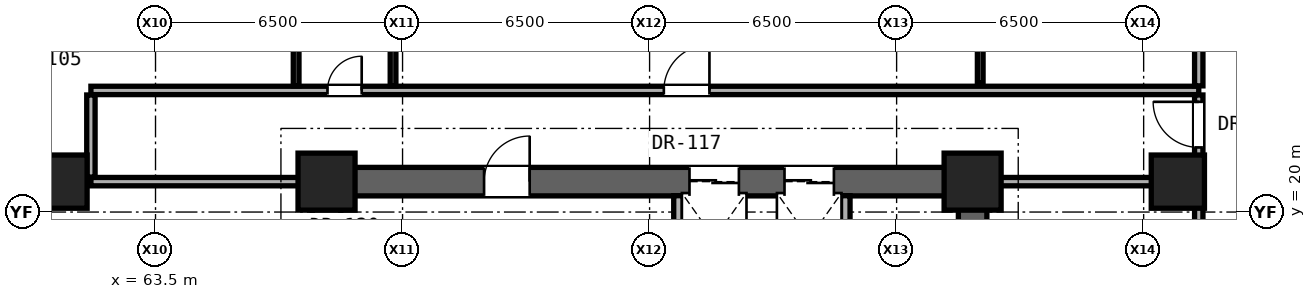
"""IFC4 building model, lengths in metres.
Left out: names, types, materials, properties, quantities, classifications, styles, units other than length and angle.
Written with IfcOpenShell. Run it as: python <this file> out.ifc"""

import sys

from ifc_helpers import new_model, si_unit, direction, frame, frame_2d, origin, origin_2d, place, context, subcontext, project, spatial, rectangle, hollow_rectangle, extrude, element, fill, save


model = new_model("IFC4")
c1 = context("Model", 3, precision=1e-05, world=origin(), true_north=direction((0.0, 1.0)))
c2 = subcontext(c1, "Body", "Model", "MODEL_VIEW")
j1 = project(units=[si_unit("LENGTHUNIT", "METRE"), si_unit("PLANEANGLEUNIT", "RADIAN")], contexts=[c1])
p1 = place(None, origin())
s1 = spatial("IfcSite", under=j1, at=p1, CompositionType="ELEMENT")
p2 = place(p1, origin())
s2 = spatial("IfcBuilding", under=s1, at=p2, CompositionType="ELEMENT")
p3 = place(p2, origin())
s3 = spatial("IfcBuildingStorey", under=s2, at=p3, CompositionType="ELEMENT", Elevation=0.0)
for number, where, z_axis, x_axis in (
    (1, (68.0, 20.8, 0.0), (0.0, 0.0, 1.0), (1.0, 0.0, 0.0)),
    (2, (85.0, 20.8, 0.0), (0.0, 0.0, 1.0), (1.0, 0.0, 0.0)),
):
    element("IfcColumn", number, at=place(p3, frame(where, z_axis=z_axis, x_axis=x_axis)), inside=s3, PredefinedType="COLUMN", context=c2, shape_type="SweptSolid", body=[
        extrude(rectangle(XDim=1.5, YDim=1.5, at=origin_2d()), origin(), (0.0, 0.0, 1.0), 5.2),
    ])
for number, where, z_axis, x_axis in (
    (3, (61.0, 20.8, 0.0), (0.0, 0.0, 1.0), (1.0, 0.0, 0.0)),
    (4, (90.4, 20.8, 0.0), (0.0, 0.0, 1.0), (1.0, 0.0, 0.0)),
):
    element("IfcColumn", number, at=place(p3, frame(where, z_axis=z_axis, x_axis=x_axis)), inside=s3, PredefinedType="COLUMN", context=c2, shape_type="SweptSolid", body=[
        extrude(hollow_rectangle(XDim=1.4, YDim=1.4, WallThickness=0.08, at=origin_2d()), origin(), (0.0, 0.0, 1.0), 5.2),
    ])
for number, where, z_axis, x_axis in (
    (5, (68.0, 15.2, 0.0), (0.0, 0.0, 1.0), (0.0, 1.0, 0.0)),
    (6, (85.0, 15.2, 0.0), (0.0, 0.0, 1.0), (0.0, 1.0, 0.0)),
):
    element("IfcWall", number, at=place(p3, frame(where, z_axis=z_axis, x_axis=x_axis)), inside=s3, PredefinedType="SHEAR", context=c2, shape_type="SweptSolid", body=[
        extrude(rectangle(XDim=5.6, YDim=0.75, at=frame_2d((2.8, 0.0))), origin(), (0.0, 0.0, 1.0), 4.88),
    ])
p4 = place(p3, frame((68.0, 20.8, 0.0), z_axis=(0.0, 0.0, 1.0), x_axis=(1.0, 0.0, 0.0)))
e7 = element("IfcWall", 7, at=p4, inside=s3, PredefinedType="SHEAR", context=c2, shape_type="SweptSolid", body=[
    extrude(rectangle(XDim=17.0, YDim=0.75, at=frame_2d((8.5, 0.0))), origin(), (0.0, 0.0, 1.0), 4.88),
])
p5 = place(p4, frame((4.145, 0.0, 0.0)))
e8 = element("IfcOpeningElement", 8, at=p5, cuts=e7, PredefinedType="OPENING", context=c2, shape_type="SweptSolid", body=[
    extrude(rectangle(XDim=1.2, YDim=2.25, at=frame_2d((0.6, 1.125))), frame((0.0, 0.385, 0.0), z_axis=(0.0, -1.0, 0.0), x_axis=(1.0, 0.0, 0.0)), (0.0, 0.0, 1.0), 0.77),
])
p6 = place(p4, frame((9.55, 0.0, 0.0)))
e9 = element("IfcOpeningElement", 9, at=p6, cuts=e7, PredefinedType="OPENING", context=c2, shape_type="SweptSolid", body=[
    extrude(rectangle(XDim=1.3, YDim=2.3, at=frame_2d((0.65, 1.15))), frame((0.0, 0.385, 0.0), z_axis=(0.0, -1.0, 0.0), x_axis=(1.0, 0.0, 0.0)), (0.0, 0.0, 1.0), 0.77),
])
p7 = place(p4, frame((12.05, 0.0, 0.0)))
e10 = element("IfcOpeningElement", 10, at=p7, cuts=e7, PredefinedType="OPENING", context=c2, shape_type="SweptSolid", body=[
    extrude(rectangle(XDim=1.3, YDim=2.3, at=frame_2d((0.65, 1.15))), frame((0.0, 0.385, 0.0), z_axis=(0.0, -1.0, 0.0), x_axis=(1.0, 0.0, 0.0)), (0.0, 0.0, 1.0), 0.77),
])
p8 = place(p3, frame((61.8, 20.8, 0.0), z_axis=(0.0, 0.0, 1.0), x_axis=(1.0, 0.0, 0.0)))
e11 = element("IfcWall", 11, at=p8, inside=s3, PredefinedType="SOLIDWALL", context=c2, shape_type="SweptSolid", body=[
    extrude(rectangle(XDim=5.83, YDim=0.22, at=frame_2d((2.915, 0.0))), origin(), (0.0, 0.0, 1.0), 3.772),
])
p9 = place(p3, frame((85.37, 20.8, 0.0), z_axis=(0.0, 0.0, 1.0), x_axis=(1.0, 0.0, 0.0)))
e12 = element("IfcWall", 12, at=p9, inside=s3, PredefinedType="SOLIDWALL", context=c2, shape_type="SweptSolid", body=[
    extrude(rectangle(XDim=5.58, YDim=0.22, at=frame_2d((2.79, 0.0))), origin(), (0.0, 0.0, 1.0), 3.772),
])
p10 = place(p3, frame((61.8, 23.2, 0.0), z_axis=(0.0, 0.0, 1.0), x_axis=(1.0, 0.0, 0.0)))
e13 = element("IfcWall", 13, at=p10, inside=s3, PredefinedType="SOLIDWALL", context=c2, shape_type="SweptSolid", body=[
    extrude(rectangle(XDim=29.15, YDim=0.22, at=frame_2d((14.575, 0.0))), origin(), (0.0, 0.0, 1.0), 3.945),
])
p11 = place(p10, frame((6.225, 0.0, 0.0)))
e14 = element("IfcOpeningElement", 14, at=p11, cuts=e13, PredefinedType="OPENING", context=c2, shape_type="SweptSolid", body=[
    extrude(rectangle(XDim=0.9, YDim=2.1, at=frame_2d((0.45, 1.05))), frame((0.0, 0.12, 0.0), z_axis=(0.0, -1.0, 0.0), x_axis=(1.0, 0.0, 0.0)), (0.0, 0.0, 1.0), 0.24),
])
p12 = place(p10, frame((15.075, 0.0, 0.0)))
e15 = element("IfcOpeningElement", 15, at=p12, cuts=e13, PredefinedType="OPENING", context=c2, shape_type="SweptSolid", body=[
    extrude(rectangle(XDim=1.2, YDim=2.25, at=frame_2d((0.6, 1.125))), frame((0.0, 0.12, 0.0), z_axis=(0.0, -1.0, 0.0), x_axis=(1.0, 0.0, 0.0)), (0.0, 0.0, 1.0), 0.24),
])
p13 = place(p3, frame((61.8, 20.92, 0.0), z_axis=(0.0, 0.0, 1.0), x_axis=(0.0, 1.0, 0.0)))
e16 = element("IfcWall", 16, at=p13, inside=s3, PredefinedType="SOLIDWALL", context=c2, shape_type="SweptSolid", body=[
    extrude(rectangle(XDim=2.16, YDim=0.22, at=frame_2d((1.08, 0.0))), origin(), (0.0, 0.0, 1.0), 3.772),
])
for number, where, z_axis, x_axis in (
    (17, (67.2, 23.32, 0.0), (0.0, 0.0, 1.0), (0.0, 1.0, 0.0)),
    (18, (69.75, 23.32, 0.0), (0.0, 0.0, 1.0), (0.0, 1.0, 0.0)),
):
    element("IfcWall", number, at=place(p3, frame(where, z_axis=z_axis, x_axis=x_axis)), inside=s3, PredefinedType="PARTITIONING", context=c2, shape_type="SweptSolid", body=[
        extrude(rectangle(XDim=2.395, YDim=0.15, at=frame_2d((1.198, 0.0))), origin(), (0.0, 0.0, 1.0), 4.88),
    ])
p14 = place(p3, frame((77.26, 18.735, 0.0), z_axis=(0.0, 0.0, 1.0), x_axis=(0.0, 1.0, 0.0)))
e19 = element("IfcWall", 19, at=p14, inside=s3, PredefinedType="SOLIDWALL", context=c2, shape_type="SweptSolid", body=[
    extrude(rectangle(XDim=1.695, YDim=0.25, at=frame_2d((0.847, 0.0))), origin(), (0.0, 0.0, 1.0), 4.88),
])
p15 = place(p3, frame((81.65, 18.185, 0.0), z_axis=(0.0, 0.0, 1.0), x_axis=(0.0, 1.0, 0.0)))
e20 = element("IfcWall", 20, at=p15, inside=s3, PredefinedType="SOLIDWALL", context=c2, shape_type="SweptSolid", body=[
    extrude(rectangle(XDim=2.245, YDim=0.25, at=frame_2d((1.123, 0.0))), origin(), (0.0, 0.0, 1.0), 4.88),
])
p16 = place(p3, frame((85.2, 23.4, 0.0), z_axis=(0.0, 0.0, 1.0), x_axis=(0.0, 1.0, 0.0)))
e21 = element("IfcWall", 21, at=p16, inside=s3, PredefinedType="PARTITIONING", context=c2, shape_type="SweptSolid", body=[
    extrude(rectangle(XDim=5.715, YDim=0.15, at=frame_2d((2.857, 0.0))), origin(), (0.0, 0.0, 1.0), 3.945),
])
p17 = place(p3, frame((90.95, 12.77, 0.0), z_axis=(0.0, 0.0, 1.0), x_axis=(0.0, 1.0, 0.0)))
e22 = element("IfcWall", 22, at=p17, inside=s3, PredefinedType="SOLIDWALL", context=c2, shape_type="SweptSolid", body=[
    extrude(rectangle(XDim=7.91, YDim=0.22, at=frame_2d((3.955, 0.0))), origin(), (0.0, 0.0, 1.0), 4.016),
])
p18 = place(p3, frame((90.95, 20.92, 0.0), z_axis=(0.0, 0.0, 1.0), x_axis=(0.0, 1.0, 0.0)))
e23 = element("IfcWall", 23, at=p18, inside=s3, PredefinedType="SOLIDWALL", context=c2, shape_type="SweptSolid", body=[
    extrude(rectangle(XDim=2.16, YDim=0.22, at=frame_2d((1.08, 0.0))), origin(), (0.0, 0.0, 1.0), 4.88),
])
p19 = place(p18, frame((0.78, 0.0, 0.0)))
e24 = element("IfcOpeningElement", 24, at=p19, cuts=e23, PredefinedType="OPENING", context=c2, shape_type="SweptSolid", body=[
    extrude(rectangle(XDim=1.2, YDim=2.25, at=frame_2d((0.6, 1.125))), frame((0.0, 0.12, 0.0), z_axis=(0.0, -1.0, 0.0), x_axis=(1.0, 0.0, 0.0)), (0.0, 0.0, 1.0), 0.24),
])
p20 = place(p3, frame((90.95, 23.32, 0.0), z_axis=(0.0, 0.0, 1.0), x_axis=(0.0, 1.0, 0.0)))
e25 = element("IfcWall", 25, at=p20, inside=s3, PredefinedType="SOLIDWALL", context=c2, shape_type="SweptSolid", body=[
    extrude(rectangle(XDim=5.96, YDim=0.22, at=frame_2d((2.98, 0.0))), origin(), (0.0, 0.0, 1.0), 4.099),
])
p21 = place(p19, origin())
e26 = element("IfcDoor", 26, at=p21, inside=s3, OperationType="SINGLE_SWING_RIGHT", PredefinedType="DOOR", context=c2, shape_type="SweptSolid", body=[
    extrude(rectangle(XDim=1.2, YDim=2.25, at=frame_2d((0.6, 1.125))), frame((0.0, 0.025, 0.0), z_axis=(0.0, -1.0, 0.0), x_axis=(1.0, 0.0, 0.0)), (0.0, 0.0, 1.0), 0.05),
])
fill(e24, e26)
p22 = place(p5, origin())
e27 = element("IfcDoor", 27, at=p22, inside=s3, OperationType="SINGLE_SWING_RIGHT", PredefinedType="DOOR", context=c2, shape_type="SweptSolid", body=[
    extrude(rectangle(XDim=1.2, YDim=2.25, at=frame_2d((0.6, 1.125))), frame((0.0, 0.025, 0.0), z_axis=(0.0, -1.0, 0.0), x_axis=(1.0, 0.0, 0.0)), (0.0, 0.0, 1.0), 0.05),
])
fill(e8, e27)
p23 = place(p11, origin())
e28 = element("IfcDoor", 28, at=p23, inside=s3, OperationType="SINGLE_SWING_RIGHT", PredefinedType="DOOR", context=c2, shape_type="SweptSolid", body=[
    extrude(rectangle(XDim=0.9, YDim=2.1, at=frame_2d((0.45, 1.05))), frame((0.0, 0.025, 0.0), z_axis=(0.0, -1.0, 0.0), x_axis=(1.0, 0.0, 0.0)), (0.0, 0.0, 1.0), 0.05),
])
fill(e14, e28)
p24 = place(p12, origin())
e29 = element("IfcDoor", 29, at=p24, inside=s3, OperationType="SINGLE_SWING_RIGHT", PredefinedType="DOOR", context=c2, shape_type="SweptSolid", body=[
    extrude(rectangle(XDim=1.2, YDim=2.25, at=frame_2d((0.6, 1.125))), frame((0.0, 0.025, 0.0), z_axis=(0.0, -1.0, 0.0), x_axis=(1.0, 0.0, 0.0)), (0.0, 0.0, 1.0), 0.05),
])
fill(e15, e29)
p25 = place(p6, origin())
e30 = element("IfcDoor", 30, at=p25, inside=s3, OperationType="DOUBLE_DOOR_SLIDING", PredefinedType="DOOR", context=c2, shape_type="SweptSolid", body=[
    extrude(rectangle(XDim=1.3, YDim=2.3, at=frame_2d((0.65, 1.15))), frame((0.0, 0.025, 0.0), z_axis=(0.0, -1.0, 0.0), x_axis=(1.0, 0.0, 0.0)), (0.0, 0.0, 1.0), 0.05),
])
fill(e9, e30)
p26 = place(p7, origin())
e31 = element("IfcDoor", 31, at=p26, inside=s3, OperationType="DOUBLE_DOOR_SLIDING", PredefinedType="DOOR", context=c2, shape_type="SweptSolid", body=[
    extrude(rectangle(XDim=1.3, YDim=2.3, at=frame_2d((0.65, 1.15))), frame((0.0, 0.025, 0.0), z_axis=(0.0, -1.0, 0.0), x_axis=(1.0, 0.0, 0.0)), (0.0, 0.0, 1.0), 0.05),
])
fill(e10, e31)
save(model, sys.argv[1])
